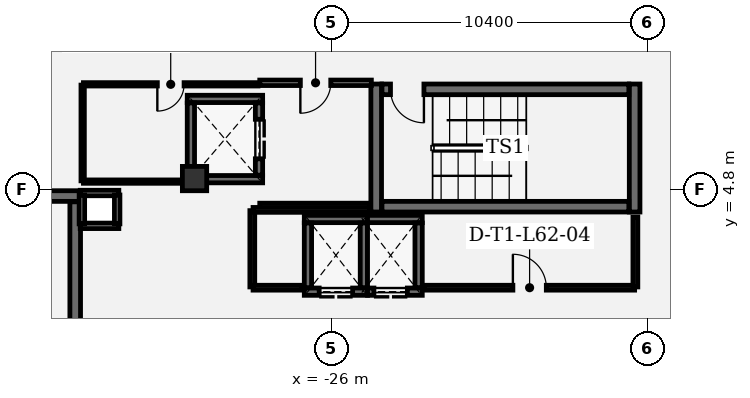
"""IFC4 building model, lengths in metres.
Left out: names, types, materials, properties, quantities, classifications, styles, units other than length and angle.
Written with IfcOpenShell. Run it as: python <this file> out.ifc"""

import sys

from ifc_helpers import new_model, si_unit, direction, frame, frame_2d, origin, origin_2d, place, context, subcontext, project, spatial, rectangle, extrude, element, fill, save


model = new_model("IFC4")
c1 = context("Model", 3, precision=1e-05, world=origin(), true_north=direction((0.0, 1.0)))
c2 = subcontext(c1, "Body", "Model", "MODEL_VIEW")
j1 = project(units=[si_unit("LENGTHUNIT", "METRE"), si_unit("PLANEANGLEUNIT", "RADIAN")], contexts=[c1])
p1 = place(None, origin())
s1 = spatial("IfcSite", under=j1, at=p1, CompositionType="ELEMENT")
p2 = place(p1, origin())
s2 = spatial("IfcBuilding", under=s1, at=p2, CompositionType="ELEMENT")
p3 = place(p2, frame((0.0, 0.0, 268.2)))
s3 = spatial("IfcBuildingStorey", under=s2, at=p3, CompositionType="ELEMENT", Elevation=268.2)
p4 = place(p3, frame((-30.5, 5.15, 0.0), z_axis=(0.0, 0.0, 1.0), x_axis=(1.0, 0.0, 0.0)))
e1 = element("IfcColumn", 1, at=p4, inside=s3, PredefinedType="COLUMN", context=c2, shape_type="SweptSolid", body=[
    extrude(rectangle(XDim=0.8, YDim=0.8, at=origin_2d()), origin(), (0.0, 0.0, 1.0), 4.2),
])
for number, where, z_axis, x_axis in (
    (2, (-24.525, 8.26, 0.0), (0.0, 0.0, 1.0), (0.0, -1.0, 0.0)),
    (3, (-16.025, 4.05, 0.0), (0.0, 0.0, 1.0), (0.0, 1.0, 0.0)),
):
    element("IfcWall", number, at=place(p3, frame(where, z_axis=z_axis, x_axis=x_axis)), inside=s3, PredefinedType="SHEAR", context=c2, shape_type="SweptSolid", body=[
        extrude(rectangle(XDim=4.21, YDim=0.35, at=frame_2d((2.105, 0.0))), origin(), (0.0, 0.0, 1.0), 3.91),
    ])
p5 = place(p3, frame((-24.335, 4.225, 0.0), z_axis=(0.0, 0.0, 1.0), x_axis=(1.0, 0.0, 0.0)))
e4 = element("IfcWall", 4, at=p5, inside=s3, PredefinedType="SHEAR", context=c2, shape_type="SweptSolid", body=[
    extrude(rectangle(XDim=8.12, YDim=0.35, at=frame_2d((4.06, 0.0))), origin(), (0.0, 0.0, 1.0), 3.91),
])
p6 = place(p3, frame((-16.215, 8.085, 0.0), z_axis=(0.0, 0.0, 1.0), x_axis=(-1.0, 0.0, 0.0)))
e5 = element("IfcWall", 5, at=p6, inside=s3, PredefinedType="SHEAR", context=c2, shape_type="SweptSolid", body=[
    extrude(rectangle(XDim=8.12, YDim=0.35, at=frame_2d((4.06, 0.0))), origin(), (0.0, 0.0, 1.0), 3.91),
])
p7 = place(p6, frame((6.74, 0.0, 0.0)))
e6 = element("IfcOpeningElement", 6, at=p7, cuts=e5, PredefinedType="OPENING", context=c2, shape_type="SweptSolid", body=[
    extrude(rectangle(XDim=1.1, YDim=2.2, at=frame_2d((0.55, 1.1))), frame((0.0, 0.185, 0.0), z_axis=(0.0, -1.0, 0.0), x_axis=(1.0, 0.0, 0.0)), (0.0, 0.0, 1.0), 0.37),
])
p8 = place(p3, frame((-34.25, 4.575, 0.0), z_axis=(0.0, 0.0, 1.0), x_axis=(-1.0, 0.0, 0.0)))
e7 = element("IfcWall", 7, at=p8, inside=s3, PredefinedType="SHEAR", context=c2, shape_type="SweptSolid", body=[
    extrude(rectangle(XDim=4.21, YDim=0.35, at=frame_2d((2.105, 0.0))), origin(), (0.0, 0.0, 1.0), 3.91),
])
p9 = place(p3, frame((-34.425, -4.385, 0.0), z_axis=(0.0, 0.0, 1.0), x_axis=(0.0, 1.0, 0.0)))
e8 = element("IfcWall", 8, at=p9, inside=s3, PredefinedType="SHEAR", context=c2, shape_type="SweptSolid", body=[
    extrude(rectangle(XDim=8.77, YDim=0.35, at=frame_2d((4.385, 0.0))), origin(), (0.0, 0.0, 1.0), 3.91),
])
for number, where, z_axis, x_axis in (
    (9, (-28.26, 5.13, 0.0), (0.0, 0.0, 1.0), (-1.0, 0.0, 0.0)),
    (10, (-30.74, 7.77, 0.0), (0.0, 0.0, 1.0), (1.0, 0.0, 0.0)),
):
    element("IfcWall", number, at=place(p3, frame(where, z_axis=z_axis, x_axis=x_axis)), inside=s3, PredefinedType="SHEAR", context=c2, shape_type="SweptSolid", body=[
        extrude(rectangle(XDim=2.48, YDim=0.24, at=frame_2d((1.24, 0.0))), origin(), (0.0, 0.0, 1.0), 3.91),
    ])
p10 = place(p3, frame((-30.62, 5.262, 0.0), z_axis=(0.0, 0.0, 1.0), x_axis=(0.0, 1.0, 0.0)))
e11 = element("IfcWall", 11, at=p10, inside=s3, PredefinedType="SHEAR", context=c2, shape_type="SweptSolid", body=[
    extrude(rectangle(XDim=2.376, YDim=0.24, at=frame_2d((1.188, 0.0))), origin(), (0.0, 0.0, 1.0), 3.91),
])
p11 = place(p3, frame((-28.38, 7.638, 0.0), z_axis=(0.0, 0.0, 1.0), x_axis=(0.0, -1.0, 0.0)))
e12 = element("IfcWall", 12, at=p11, inside=s3, PredefinedType="SHEAR", context=c2, shape_type="SweptSolid", body=[
    extrude(rectangle(XDim=2.376, YDim=0.24, at=frame_2d((1.188, 0.0))), origin(), (0.0, 0.0, 1.0), 3.91),
])
p12 = place(p11, frame((0.538, 0.0, 0.0)))
e13 = element("IfcOpeningElement", 13, at=p12, cuts=e12, PredefinedType="OPENING", context=c2, shape_type="SweptSolid", body=[
    extrude(rectangle(XDim=1.3, YDim=2.3, at=frame_2d((0.65, 1.15))), frame((0.0, 0.13, 0.0), z_axis=(0.0, -1.0, 0.0), x_axis=(1.0, 0.0, 0.0)), (0.0, 0.0, 1.0), 0.26),
])
p13 = place(p3, frame((-24.81, 1.43, 0.0), z_axis=(0.0, 0.0, 1.0), x_axis=(-1.0, 0.0, 0.0)))
e14 = element("IfcWall", 14, at=p13, inside=s3, PredefinedType="SHEAR", context=c2, shape_type="SweptSolid", body=[
    extrude(rectangle(XDim=2.08, YDim=0.24, at=frame_2d((1.04, 0.0))), origin(), (0.0, 0.0, 1.0), 3.91),
])
p14 = place(p13, frame((0.49, 0.0, 0.0)))
e15 = element("IfcOpeningElement", 15, at=p14, cuts=e14, PredefinedType="OPENING", context=c2, shape_type="SweptSolid", body=[
    extrude(rectangle(XDim=1.1, YDim=2.2, at=frame_2d((0.55, 1.1))), frame((0.0, 0.13, 0.0), z_axis=(0.0, -1.0, 0.0), x_axis=(1.0, 0.0, 0.0)), (0.0, 0.0, 1.0), 0.26),
])
p15 = place(p3, frame((-26.89, 3.82, 0.0), z_axis=(0.0, 0.0, 1.0), x_axis=(1.0, 0.0, 0.0)))
e16 = element("IfcWall", 16, at=p15, inside=s3, PredefinedType="SHEAR", context=c2, shape_type="SweptSolid", body=[
    extrude(rectangle(XDim=2.08, YDim=0.24, at=frame_2d((1.04, 0.0))), origin(), (0.0, 0.0, 1.0), 3.91),
])
for number, where, z_axis, x_axis in (
    (17, (-26.77, 1.562, 0.0), (0.0, 0.0, 1.0), (0.0, 1.0, 0.0)),
    (18, (-24.93, 3.688, 0.0), (0.0, 0.0, 1.0), (0.0, -1.0, 0.0)),
):
    element("IfcWall", number, at=place(p3, frame(where, z_axis=z_axis, x_axis=x_axis)), inside=s3, PredefinedType="SHEAR", context=c2, shape_type="SweptSolid", body=[
        extrude(rectangle(XDim=2.126, YDim=0.24, at=frame_2d((1.063, 0.0))), origin(), (0.0, 0.0, 1.0), 3.91),
    ])
p16 = place(p3, frame((-23.01, 1.43, 0.0), z_axis=(0.0, 0.0, 1.0), x_axis=(-1.0, 0.0, 0.0)))
e19 = element("IfcWall", 19, at=p16, inside=s3, PredefinedType="SHEAR", context=c2, shape_type="SweptSolid", body=[
    extrude(rectangle(XDim=1.8, YDim=0.24, at=frame_2d((0.9, 0.0))), origin(), (0.0, 0.0, 1.0), 3.91),
])
p17 = place(p16, frame((0.49, 0.0, 0.0)))
e20 = element("IfcOpeningElement", 20, at=p17, cuts=e19, PredefinedType="OPENING", context=c2, shape_type="SweptSolid", body=[
    extrude(rectangle(XDim=1.1, YDim=2.2, at=frame_2d((0.55, 1.1))), frame((0.0, 0.13, 0.0), z_axis=(0.0, -1.0, 0.0), x_axis=(1.0, 0.0, 0.0)), (0.0, 0.0, 1.0), 0.26),
])
p18 = place(p3, frame((-24.81, 3.82, 0.0), z_axis=(0.0, 0.0, 1.0), x_axis=(1.0, 0.0, 0.0)))
e21 = element("IfcWall", 21, at=p18, inside=s3, PredefinedType="SHEAR", context=c2, shape_type="SweptSolid", body=[
    extrude(rectangle(XDim=1.8, YDim=0.24, at=frame_2d((0.9, 0.0))), origin(), (0.0, 0.0, 1.0), 3.91),
])
p19 = place(p3, frame((-23.13, 3.688, 0.0), z_axis=(0.0, 0.0, 1.0), x_axis=(0.0, -1.0, 0.0)))
e22 = element("IfcWall", 22, at=p19, inside=s3, PredefinedType="SHEAR", context=c2, shape_type="SweptSolid", body=[
    extrude(rectangle(XDim=2.126, YDim=0.24, at=frame_2d((1.063, 0.0))), origin(), (0.0, 0.0, 1.0), 3.91),
])
for number, where, z_axis, x_axis in (
    (23, (-32.99, 3.595, 0.0), (0.0, 0.0, 1.0), (-1.0, 0.0, 0.0)),
    (24, (-34.26, 4.675, 0.0), (0.0, 0.0, 1.0), (1.0, 0.0, 0.0)),
):
    element("IfcWall", number, at=place(p3, frame(where, z_axis=z_axis, x_axis=x_axis)), inside=s3, PredefinedType="PARTITIONING", context=c2, shape_type="SweptSolid", body=[
        extrude(rectangle(XDim=1.27, YDim=0.18, at=frame_2d((0.635, 0.0))), origin(), (0.0, 0.0, 1.0), 3.91),
    ])
for number, where, z_axis, x_axis in (
    (25, (-34.205, 3.66, 0.0), (0.0, 0.0, 1.0), (0.0, 1.0, 0.0)),
    (26, (-33.045, 4.61, 0.0), (0.0, 0.0, 1.0), (0.0, -1.0, 0.0)),
):
    element("IfcWall", number, at=place(p3, frame(where, z_axis=z_axis, x_axis=x_axis)), inside=s3, PredefinedType="PARTITIONING", context=c2, shape_type="SweptSolid", body=[
        extrude(rectangle(XDim=0.95, YDim=0.18, at=frame_2d((0.475, 0.0))), origin(), (0.0, 0.0, 1.0), 3.91),
    ])
p20 = place(p3, frame((-28.355, 4.25, 0.0), z_axis=(0.0, 0.0, 1.0), x_axis=(1.0, 0.0, 0.0)))
e27 = element("IfcWall", 27, at=p20, inside=s3, PredefinedType="PARTITIONING", context=c2, shape_type="SweptSolid", body=[
    extrude(rectangle(XDim=3.622, YDim=0.18, at=frame_2d((1.811, 0.0))), origin(), (0.0, 0.0, 1.0), 3.91),
])
p21 = place(p3, frame((-24.684, 8.3, 0.0), z_axis=(0.0, 0.0, 1.0), x_axis=(-1.0, 0.0, 0.0)))
e28 = element("IfcWall", 28, at=p21, inside=s3, PredefinedType="PARTITIONING", context=c2, shape_type="SweptSolid", body=[
    extrude(rectangle(XDim=3.671, YDim=0.18, at=frame_2d((1.835, 0.0))), origin(), (0.0, 0.0, 1.0), 3.529),
])
p22 = place(p21, frame((1.335, 0.0, 0.0)))
e29 = element("IfcOpeningElement", 29, at=p22, cuts=e28, PredefinedType="OPENING", context=c2, shape_type="SweptSolid", body=[
    extrude(rectangle(XDim=1.0, YDim=2.15, at=frame_2d((0.5, 1.075))), frame((0.0, 0.1, 0.0), z_axis=(0.0, -1.0, 0.0), x_axis=(1.0, 0.0, 0.0)), (0.0, 0.0, 1.0), 0.2),
])
p23 = place(p3, frame((-34.18, 8.225, 0.0), z_axis=(0.0, 0.0, 1.0), x_axis=(0.0, -1.0, 0.0)))
e30 = element("IfcWall", 30, at=p23, inside=s3, PredefinedType="PARTITIONING", context=c2, shape_type="SweptSolid", body=[
    extrude(rectangle(XDim=3.15, YDim=0.11, at=frame_2d((1.575, 0.0))), origin(), (0.0, 0.0, 1.0), 3.91),
])
p24 = place(p3, frame((-34.155, 5.05, 0.0), z_axis=(0.0, 0.0, 1.0), x_axis=(1.0, 0.0, 0.0)))
e31 = element("IfcWall", 31, at=p24, inside=s3, PredefinedType="PARTITIONING", context=c2, shape_type="SweptSolid", body=[
    extrude(rectangle(XDim=3.19, YDim=0.11, at=frame_2d((1.595, 0.0))), origin(), (0.0, 0.0, 1.0), 3.91),
])
p25 = place(p3, frame((-28.413, 8.25, 0.0), z_axis=(0.0, 0.0, 1.0), x_axis=(-1.0, 0.0, 0.0)))
e32 = element("IfcWall", 32, at=p25, inside=s3, PredefinedType="PARTITIONING", context=c2, shape_type="SweptSolid", body=[
    extrude(rectangle(XDim=5.742, YDim=0.11, at=frame_2d((2.871, 0.0))), origin(), (0.0, 0.0, 1.0), 3.529),
])
p26 = place(p25, frame((2.431, 0.0, 0.0)))
e33 = element("IfcOpeningElement", 33, at=p26, cuts=e32, PredefinedType="OPENING", context=c2, shape_type="SweptSolid", body=[
    extrude(rectangle(XDim=0.88, YDim=2.1, at=frame_2d((0.44, 1.05))), frame((0.0, 0.065, 0.0), z_axis=(0.0, -1.0, 0.0), x_axis=(1.0, 0.0, 0.0)), (0.0, 0.0, 1.0), 0.13),
])
p27 = place(p3, frame((-28.6, 4.095, 0.0), z_axis=(0.0, 0.0, 1.0), x_axis=(0.0, -1.0, 0.0)))
e34 = element("IfcWall", 34, at=p27, inside=s3, PredefinedType="PARTITIONING", context=c2, shape_type="SweptSolid", body=[
    extrude(rectangle(XDim=2.51, YDim=0.16, at=frame_2d((1.255, 0.0))), origin(), (0.0, 0.0, 1.0), 3.91),
])
p28 = place(p3, frame((-28.575, 1.56, 0.0), z_axis=(0.0, 0.0, 1.0), x_axis=(1.0, 0.0, 0.0)))
e35 = element("IfcWall", 35, at=p28, inside=s3, PredefinedType="PARTITIONING", context=c2, shape_type="SweptSolid", body=[
    extrude(rectangle(XDim=1.609, YDim=0.16, at=frame_2d((0.805, 0.0))), origin(), (0.0, 0.0, 1.0), 3.91),
])
p29 = place(p3, frame((-22.934, 1.56, 0.0), z_axis=(0.0, 0.0, 1.0), x_axis=(1.0, 0.0, 0.0)))
e36 = element("IfcWall", 36, at=p29, inside=s3, PredefinedType="PARTITIONING", context=c2, shape_type="SweptSolid", body=[
    extrude(rectangle(XDim=6.909, YDim=0.16, at=frame_2d((3.455, 0.0))), origin(), (0.0, 0.0, 1.0), 3.91),
])
p30 = place(p29, frame((2.905, 0.0, 0.0)))
e37 = element("IfcOpeningElement", 37, at=p30, cuts=e36, PredefinedType="OPENING", context=c2, shape_type="SweptSolid", body=[
    extrude(rectangle(XDim=1.1, YDim=2.15, at=frame_2d((0.55, 1.075))), frame((0.0, 0.09, 0.0), z_axis=(0.0, -1.0, 0.0), x_axis=(1.0, 0.0, 0.0)), (0.0, 0.0, 1.0), 0.18),
])
p31 = place(p3, frame((-16.0, 1.585, 0.0), z_axis=(0.0, 0.0, 1.0), x_axis=(0.0, 1.0, 0.0)))
e38 = element("IfcWall", 38, at=p31, inside=s3, PredefinedType="PARTITIONING", context=c2, shape_type="SweptSolid", body=[
    extrude(rectangle(XDim=2.302, YDim=0.16, at=frame_2d((1.151, 0.0))), origin(), (0.0, 0.0, 1.0), 3.91),
])
p32 = place(p3, frame((-24.733, 4.12, 0.0), z_axis=(0.0, 0.0, 1.0), x_axis=(-1.0, 0.0, 0.0)))
e39 = element("IfcWall", 39, at=p32, inside=s3, PredefinedType="PARTITIONING", context=c2, shape_type="SweptSolid", body=[
    extrude(rectangle(XDim=3.842, YDim=0.16, at=frame_2d((1.921, 0.0))), origin(), (0.0, 0.0, 1.0), 3.91),
])
p33 = place(p7, origin())
e40 = element("IfcDoor", 40, at=p33, inside=s3, OperationType="SINGLE_SWING_LEFT", PredefinedType="DOOR", context=c2, shape_type="SweptSolid", body=[
    extrude(rectangle(XDim=1.1, YDim=2.2, at=frame_2d((0.55, 1.1))), frame((0.0, 0.025, 0.0), z_axis=(0.0, -1.0, 0.0), x_axis=(1.0, 0.0, 0.0)), (0.0, 0.0, 1.0), 0.05),
])
fill(e6, e40)
p34 = place(p12, origin())
e41 = element("IfcDoor", 41, at=p34, inside=s3, OperationType="DOUBLE_DOOR_SLIDING", PredefinedType="DOOR", context=c2, shape_type="SweptSolid", body=[
    extrude(rectangle(XDim=1.3, YDim=2.3, at=frame_2d((0.65, 1.15))), frame((0.0, 0.025, 0.0), z_axis=(0.0, -1.0, 0.0), x_axis=(1.0, 0.0, 0.0)), (0.0, 0.0, 1.0), 0.05),
])
fill(e13, e41)
p35 = place(p14, origin())
e42 = element("IfcDoor", 42, at=p35, inside=s3, OperationType="DOUBLE_DOOR_SLIDING", PredefinedType="DOOR", context=c2, shape_type="SweptSolid", body=[
    extrude(rectangle(XDim=1.1, YDim=2.2, at=frame_2d((0.55, 1.1))), frame((0.0, 0.025, 0.0), z_axis=(0.0, -1.0, 0.0), x_axis=(1.0, 0.0, 0.0)), (0.0, 0.0, 1.0), 0.05),
])
fill(e15, e42)
p36 = place(p17, origin())
e43 = element("IfcDoor", 43, at=p36, inside=s3, OperationType="DOUBLE_DOOR_SLIDING", PredefinedType="DOOR", context=c2, shape_type="SweptSolid", body=[
    extrude(rectangle(XDim=1.1, YDim=2.2, at=frame_2d((0.55, 1.1))), frame((0.0, 0.025, 0.0), z_axis=(0.0, -1.0, 0.0), x_axis=(1.0, 0.0, 0.0)), (0.0, 0.0, 1.0), 0.05),
])
fill(e20, e43)
p37 = place(p22, origin())
e44 = element("IfcDoor", 44, at=p37, inside=s3, OperationType="SINGLE_SWING_RIGHT", PredefinedType="DOOR", context=c2, shape_type="SweptSolid", body=[
    extrude(rectangle(XDim=1.0, YDim=2.15, at=frame_2d((0.5, 1.075))), frame((0.0, 0.025, 0.0), z_axis=(0.0, -1.0, 0.0), x_axis=(1.0, 0.0, 0.0)), (0.0, 0.0, 1.0), 0.05),
])
fill(e29, e44)
p38 = place(p26, origin())
e45 = element("IfcDoor", 45, at=p38, inside=s3, OperationType="SINGLE_SWING_RIGHT", PredefinedType="DOOR", context=c2, shape_type="SweptSolid", body=[
    extrude(rectangle(XDim=0.88, YDim=2.1, at=frame_2d((0.44, 1.05))), frame((0.0, 0.025, 0.0), z_axis=(0.0, -1.0, 0.0), x_axis=(1.0, 0.0, 0.0)), (0.0, 0.0, 1.0), 0.05),
])
fill(e33, e45)
p39 = place(p30, origin())
e46 = element("IfcDoor", 46, at=p39, inside=s3, OperationType="SINGLE_SWING_LEFT", PredefinedType="DOOR", context=c2, shape_type="SweptSolid", body=[
    extrude(rectangle(XDim=1.1, YDim=2.15, at=frame_2d((0.55, 1.075))), frame((0.0, 0.025, 0.0), z_axis=(0.0, -1.0, 0.0), x_axis=(1.0, 0.0, 0.0)), (0.0, 0.0, 1.0), 0.05),
])
fill(e37, e46)
save(model, sys.argv[1])
